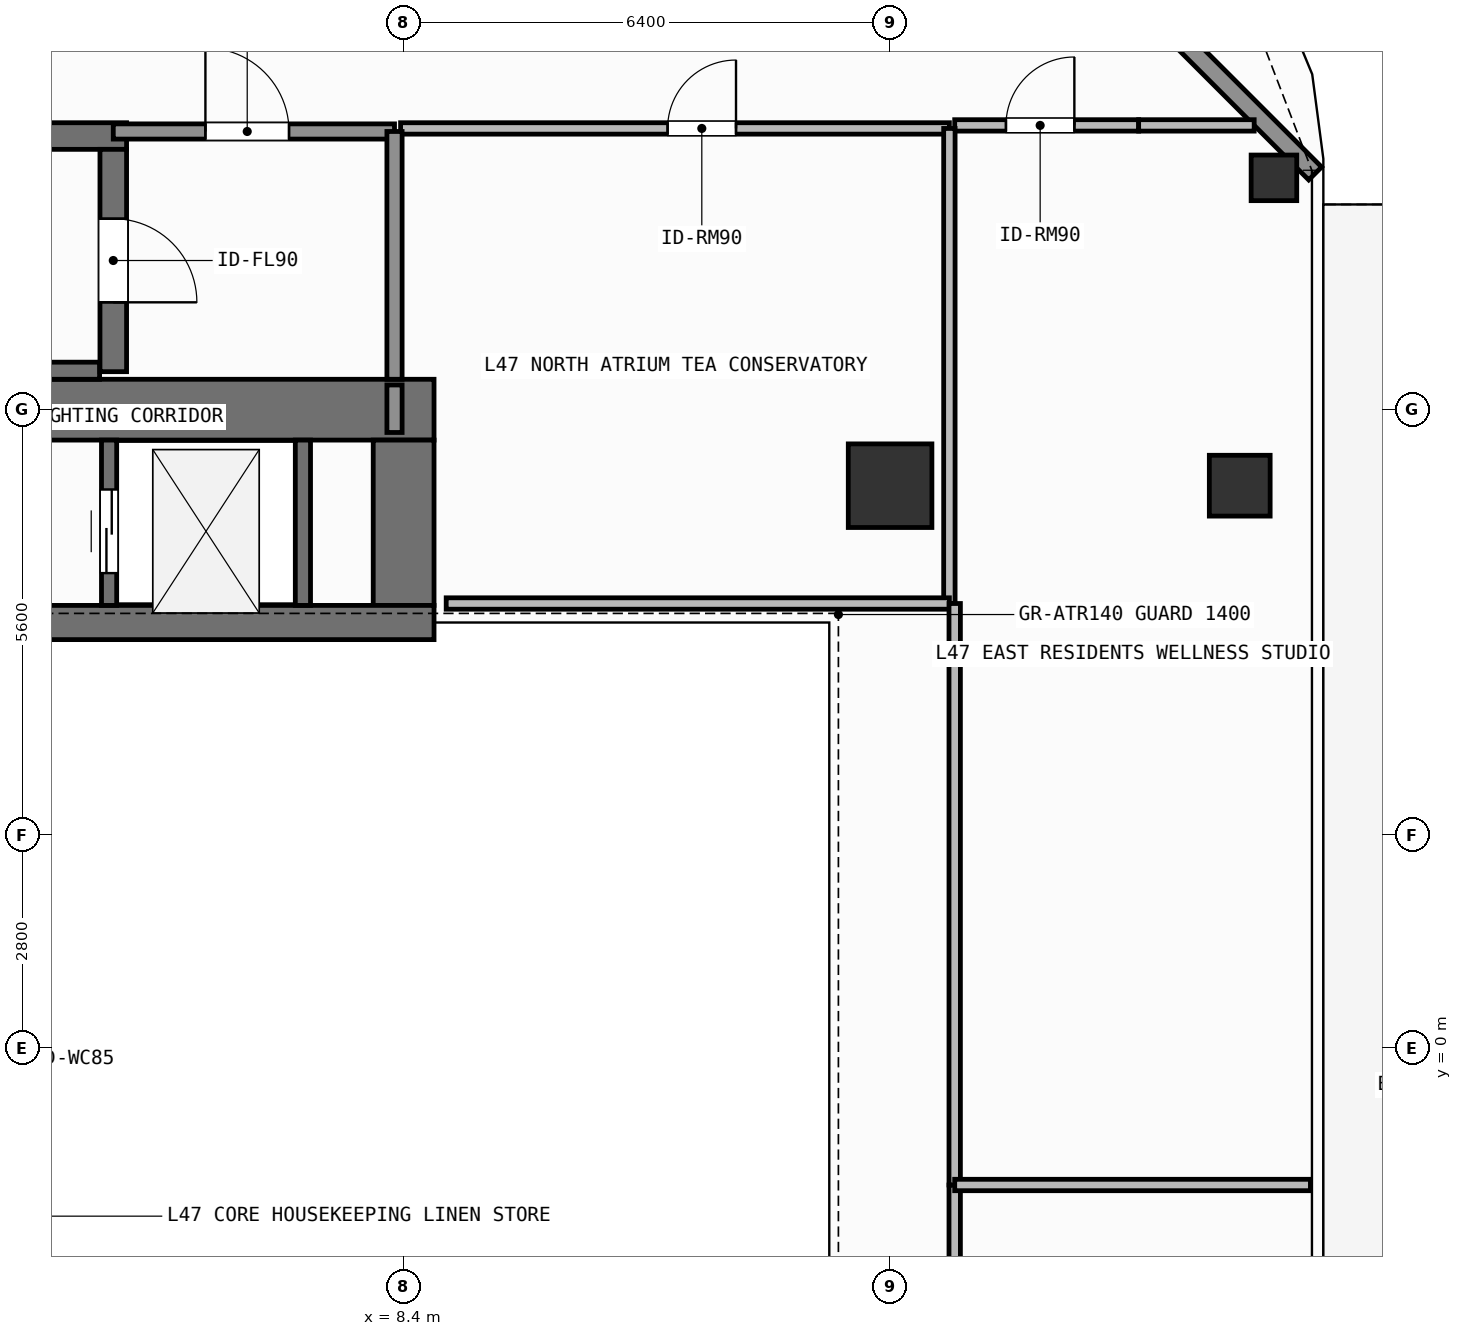
"""IFC4 building model, lengths in metres.
Left out: names, types, materials, properties, quantities, classifications, styles, units other than length and angle.
Written with IfcOpenShell. Run it as: python <this file> out.ifc"""

import sys

from ifc_helpers import new_model, si_unit, direction, frame, frame_2d, origin, origin_2d, place, context, subcontext, project, spatial, rectangle, hollow_rectangle, extrude, element, fill, save


model = new_model("IFC4")
c1 = context("Model", 3, precision=1e-05, world=origin(), true_north=direction((0.0, 1.0)))
c2 = subcontext(c1, "Body", "Model", "MODEL_VIEW")
j1 = project(units=[si_unit("LENGTHUNIT", "METRE"), si_unit("PLANEANGLEUNIT", "RADIAN")], contexts=[c1])
p1 = place(None, origin())
s1 = spatial("IfcSite", under=j1, at=p1, CompositionType="ELEMENT")
p2 = place(p1, origin())
s2 = spatial("IfcBuilding", under=s1, at=p2, CompositionType="ELEMENT")
p3 = place(p2, frame((0.0, 0.0, 191.4)))
s3 = spatial("IfcBuildingStorey", under=s2, at=p3, CompositionType="ELEMENT", Elevation=191.4)
p4 = place(p3, frame((-7.55, 8.4, 0.0), z_axis=(0.0, 0.0, 1.0), x_axis=(1.0, 0.0, 0.0)))
e1 = element("IfcWall", 1, at=p4, inside=s3, PredefinedType="SHEAR", context=c2, shape_type="SweptSolid", body=[
    extrude(rectangle(XDim=16.35, YDim=0.8, at=frame_2d((8.175, 0.0))), origin(), (0.0, 0.0, 1.0), 3.9),
])
p5 = place(p3, frame((8.4, 5.825, 0.0), z_axis=(0.0, 0.0, 1.0), x_axis=(0.0, 1.0, 0.0)))
e2 = element("IfcWall", 2, at=p5, inside=s3, PredefinedType="SHEAR", context=c2, shape_type="SweptSolid", body=[
    extrude(rectangle(XDim=2.175, YDim=0.8, at=frame_2d((1.087, 0.0))), origin(), (0.0, 0.0, 1.0), 3.9),
])
p6 = place(p3, frame((3.045, 5.6, 0.0), z_axis=(0.0, 0.0, 1.0), x_axis=(1.0, 0.0, 0.0)))
e3 = element("IfcWall", 3, at=p6, inside=s3, PredefinedType="SHEAR", context=c2, shape_type="SweptSolid", body=[
    extrude(rectangle(XDim=5.755, YDim=0.45, at=frame_2d((2.877, 0.0))), origin(), (0.0, 0.0, 1.0), 3.9),
])
p7 = place(p3, frame((-2.555, 12.0, 0.0), z_axis=(0.0, 0.0, 1.0), x_axis=(1.0, 0.0, 0.0)))
e4 = element("IfcWall", 4, at=p7, inside=s3, PredefinedType="SHEAR", context=c2, shape_type="SweptSolid", body=[
    extrude(rectangle(XDim=7.31, YDim=0.35, at=frame_2d((3.655, 0.0))), origin(), (0.0, 0.0, 1.0), 3.9),
])
p8 = place(p3, frame((-2.2, 8.913, 0.0), z_axis=(0.0, 0.0, 1.0), x_axis=(1.0, 0.0, 0.0)))
e5 = element("IfcWall", 5, at=p8, inside=s3, PredefinedType="SHEAR", context=c2, shape_type="SweptSolid", body=[
    extrude(rectangle(XDim=6.6, YDim=0.225, at=frame_2d((3.3, 0.0))), origin(), (0.0, 0.0, 1.0), 3.9),
])
p9 = place(p3, frame((4.58, 11.825, 0.0), z_axis=(0.0, 0.0, 1.0), x_axis=(0.0, -1.0, 0.0)))
e6 = element("IfcWall", 6, at=p9, inside=s3, PredefinedType="SHEAR", context=c2, shape_type="SweptSolid", body=[
    extrude(rectangle(XDim=2.925, YDim=0.35, at=frame_2d((1.462, 0.0))), origin(), (0.0, 0.0, 1.0), 3.9),
])
p10 = place(p9, frame((0.913, 0.0, 0.0)))
e7 = element("IfcOpeningElement", 7, at=p10, cuts=e6, PredefinedType="OPENING", context=c2, shape_type="SweptSolid", body=[
    extrude(rectangle(XDim=1.1, YDim=2.15, at=frame_2d((0.55, 1.075))), frame((0.0, 0.185, 0.0), z_axis=(0.0, -1.0, 0.0), x_axis=(1.0, 0.0, 0.0)), (0.0, 0.0, 1.0), 0.37),
])
p11 = place(p3, frame((14.8, 7.4, 0.0), z_axis=(0.0, 0.0, 1.0), x_axis=(1.0, 0.0, 0.0)))
e8 = element("IfcColumn", 8, at=p11, inside=s3, PredefinedType="COLUMN", context=c2, shape_type="SweptSolid", body=[
    extrude(rectangle(XDim=1.1, YDim=1.1, at=origin_2d()), origin(), (0.0, 0.0, 1.0), 3.9),
])
p12 = place(p3, frame((19.4, 7.4, 0.0), z_axis=(0.0, 0.0, 1.0), x_axis=(1.0, 0.0, 0.0)))
e9 = element("IfcColumn", 9, at=p12, inside=s3, PredefinedType="COLUMN", context=c2, shape_type="SweptSolid", body=[
    extrude(hollow_rectangle(XDim=0.8, YDim=0.8, WallThickness=0.036, at=origin_2d()), origin(), (0.0, 0.0, 1.0), 3.9),
])
p13 = place(p3, frame((19.85, 11.45, 0.0), z_axis=(0.0, 0.0, 1.0), x_axis=(1.0, 0.0, 0.0)))
e10 = element("IfcColumn", 10, at=p13, inside=s3, PredefinedType="COLUMN", context=c2, shape_type="SweptSolid", body=[
    extrude(hollow_rectangle(XDim=0.6, YDim=0.6, WallThickness=0.028, at=origin_2d()), origin(), (0.0, 0.0, 1.0), 3.9),
])
p14 = place(p3, frame((16.008, 15.892, 0.0), z_axis=(0.0, 0.0, 1.0), x_axis=(0.707106781187, -0.707106781187, 0.0)))
e11 = element("IfcWall", 11, at=p14, inside=s3, PredefinedType="SOLIDWALL", context=c2, shape_type="SweptSolid", body=[
    extrude(rectangle(XDim=6.201, YDim=0.24, at=frame_2d((3.101, 0.0))), origin(), (0.0, 0.0, 1.0), 3.68),
])
p15 = place(p3, frame((4.525, 5.825, 0.0), z_axis=(0.0, 0.0, 1.0), x_axis=(0.0, 1.0, 0.0)))
e12 = element("IfcWall", 12, at=p15, inside=s3, PredefinedType="SHEAR", context=c2, shape_type="SweptSolid", body=[
    extrude(rectangle(XDim=2.175, YDim=0.2, at=frame_2d((1.087, 0.0))), origin(), (0.0, 0.0, 1.0), 3.68),
])
p16 = place(p15, frame((0.425, 0.0, 0.0)))
e13 = element("IfcOpeningElement", 13, at=p16, cuts=e12, PredefinedType="OPENING", context=c2, shape_type="SweptSolid", body=[
    extrude(rectangle(XDim=1.1, YDim=2.2, at=frame_2d((0.55, 1.1))), frame((0.0, 0.11, 0.0), z_axis=(0.0, -1.0, 0.0), x_axis=(1.0, 0.0, 0.0)), (0.0, 0.0, 1.0), 0.22),
])
p17 = place(p3, frame((7.075, 5.825, 0.0), z_axis=(0.0, 0.0, 1.0), x_axis=(0.0, 1.0, 0.0)))
e14 = element("IfcWall", 14, at=p17, inside=s3, PredefinedType="SHEAR", context=c2, shape_type="SweptSolid", body=[
    extrude(rectangle(XDim=2.175, YDim=0.2, at=frame_2d((1.087, 0.0))), origin(), (0.0, 0.0, 1.0), 3.68),
])
p18 = place(p3, frame((4.58, 12.06, 0.0), z_axis=(0.0, 0.0, 1.0), x_axis=(1.0, 0.0, 0.0)))
e15 = element("IfcWall", 15, at=p18, inside=s3, PredefinedType="SOLIDWALL", context=c2, shape_type="SweptSolid", body=[
    extrude(rectangle(XDim=3.7, YDim=0.2, at=frame_2d((1.85, 0.0))), origin(), (0.0, 0.0, 1.0), 3.68),
])
p19 = place(p18, frame((1.212, 0.0, 0.0)))
e16 = element("IfcOpeningElement", 16, at=p19, cuts=e15, PredefinedType="OPENING", context=c2, shape_type="SweptSolid", body=[
    extrude(rectangle(XDim=1.1, YDim=2.15, at=frame_2d((0.55, 1.075))), frame((0.0, 0.11, 0.0), z_axis=(0.0, -1.0, 0.0), x_axis=(1.0, 0.0, 0.0)), (0.0, 0.0, 1.0), 0.22),
])
p20 = place(p3, frame((8.36, 12.1, 0.0), z_axis=(0.0, 0.0, 1.0), x_axis=(1.0, 0.0, 0.0)))
e17 = element("IfcWall", 17, at=p20, inside=s3, PredefinedType="PARTITIONING", context=c2, shape_type="SweptSolid", body=[
    extrude(rectangle(XDim=7.22, YDim=0.15, at=frame_2d((3.61, 0.0))), origin(), (0.0, 0.0, 1.0), 3.68),
])
p21 = place(p20, frame((3.513, 0.0, 0.0)))
e18 = element("IfcOpeningElement", 18, at=p21, cuts=e17, PredefinedType="OPENING", context=c2, shape_type="SweptSolid", body=[
    extrude(rectangle(XDim=0.9, YDim=2.1, at=frame_2d((0.45, 1.05))), frame((0.0, 0.085, 0.0), z_axis=(0.0, -1.0, 0.0), x_axis=(1.0, 0.0, 0.0)), (0.0, 0.0, 1.0), 0.17),
])
p22 = place(p3, frame((15.65, 12.14, 0.0), z_axis=(0.0, 0.0, 1.0), x_axis=(1.0, 0.0, 0.0)))
e19 = element("IfcWall", 19, at=p22, inside=s3, PredefinedType="PARTITIONING", context=c2, shape_type="SweptSolid", body=[
    extrude(rectangle(XDim=2.42, YDim=0.15, at=frame_2d((1.21, 0.0))), origin(), (0.0, 0.0, 1.0), 3.68),
])
p23 = place(p22, frame((0.674, 0.0, 0.0)))
e20 = element("IfcOpeningElement", 20, at=p23, cuts=e19, PredefinedType="OPENING", context=c2, shape_type="SweptSolid", body=[
    extrude(rectangle(XDim=0.9, YDim=2.1, at=frame_2d((0.45, 1.05))), frame((0.0, 0.085, 0.0), z_axis=(0.0, -1.0, 0.0), x_axis=(1.0, 0.0, 0.0)), (0.0, 0.0, 1.0), 0.17),
])
p24 = place(p3, frame((8.28, 8.8, 0.0), z_axis=(0.0, 0.0, 1.0), x_axis=(0.0, 1.0, 0.0)))
e21 = element("IfcWall", 21, at=p24, inside=s3, PredefinedType="SOLIDWALL", context=c2, shape_type="SweptSolid", body=[
    extrude(rectangle(XDim=3.26, YDim=0.2, at=frame_2d((1.63, 0.0))), origin(), (0.0, 0.0, 1.0), 3.68),
])
p25 = place(p3, frame((8.28, 8.1, 0.0), z_axis=(0.0, 0.0, 1.0), x_axis=(0.0, 1.0, 0.0)))
e22 = element("IfcWall", 22, at=p25, inside=s3, PredefinedType="SOLIDWALL", context=c2, shape_type="SweptSolid", body=[
    extrude(rectangle(XDim=0.625, YDim=0.2, at=frame_2d((0.312, 0.0))), origin(), (0.0, 0.0, 1.0), 3.68),
])
p26 = place(p3, frame((15.58, 5.85, 0.0), z_axis=(0.0, 0.0, 1.0), x_axis=(0.0, 1.0, 0.0)))
e23 = element("IfcWall", 23, at=p26, inside=s3, PredefinedType="PARTITIONING", context=c2, shape_type="SweptSolid", body=[
    extrude(rectangle(XDim=6.25, YDim=0.15, at=frame_2d((3.125, 0.0))), origin(), (0.0, 0.0, 1.0), 3.68),
])
p27 = place(p3, frame((8.96, 5.85, 0.0), z_axis=(0.0, 0.0, 1.0), x_axis=(1.0, 0.0, 0.0)))
e24 = element("IfcWall", 24, at=p27, inside=s3, PredefinedType="PARTITIONING", context=c2, shape_type="SweptSolid", body=[
    extrude(rectangle(XDim=6.62, YDim=0.15, at=frame_2d((3.31, 0.0))), origin(), (0.0, 0.0, 1.0), 3.68),
])
p28 = place(p3, frame((15.65, -5.85, 0.0), z_axis=(0.0, 0.0, 1.0), x_axis=(0.0, 1.0, 0.0)))
e25 = element("IfcWall", 25, at=p28, inside=s3, PredefinedType="PARTITIONING", context=c2, shape_type="SweptSolid", body=[
    extrude(rectangle(XDim=4.05, YDim=0.15, at=frame_2d((2.025, 0.0))), origin(), (0.0, 0.0, 1.0), 3.68),
])
p29 = place(p3, frame((15.65, -1.8, 0.0), z_axis=(0.0, 0.0, 1.0), x_axis=(0.0, 1.0, 0.0)))
e26 = element("IfcWall", 26, at=p29, inside=s3, PredefinedType="PARTITIONING", context=c2, shape_type="SweptSolid", body=[
    extrude(rectangle(XDim=7.65, YDim=0.15, at=frame_2d((3.825, 0.0))), origin(), (0.0, 0.0, 1.0), 3.68),
])
p30 = place(p3, frame((15.65, -1.8, 0.0), z_axis=(0.0, 0.0, 1.0), x_axis=(1.0, 0.0, 0.0)))
e27 = element("IfcWall", 27, at=p30, inside=s3, PredefinedType="PARTITIONING", context=c2, shape_type="SweptSolid", body=[
    extrude(rectangle(XDim=4.68, YDim=0.15, at=frame_2d((2.34, 0.0))), origin(), (0.0, 0.0, 1.0), 3.68),
])
p31 = place(p3, frame((18.07, 12.14, 0.0), z_axis=(0.0, 0.0, 1.0), x_axis=(1.0, 0.0, 0.0)))
e28 = element("IfcWall", 28, at=p31, inside=s3, PredefinedType="PARTITIONING", context=c2, shape_type="SweptSolid", body=[
    extrude(rectangle(XDim=1.52, YDim=0.15, at=frame_2d((0.76, 0.0))), origin(), (0.0, 0.0, 1.0), 3.68),
])
p32 = place(p16, origin())
e29 = element("IfcDoor", 29, at=p32, inside=s3, OperationType="SLIDING_TO_LEFT", PredefinedType="DOOR", context=c2, shape_type="SweptSolid", body=[
    extrude(rectangle(XDim=1.1, YDim=2.2, at=frame_2d((0.55, 1.1))), frame((0.0, 0.025, 0.0), z_axis=(0.0, -1.0, 0.0), x_axis=(1.0, 0.0, 0.0)), (0.0, 0.0, 1.0), 0.05),
])
fill(e13, e29)
p33 = place(p10, origin())
e30 = element("IfcDoor", 30, at=p33, inside=s3, OperationType="SINGLE_SWING_RIGHT", PredefinedType="DOOR", context=c2, shape_type="SweptSolid", body=[
    extrude(rectangle(XDim=1.1, YDim=2.15, at=frame_2d((0.55, 1.075))), frame((0.0, 0.025, 0.0), z_axis=(0.0, -1.0, 0.0), x_axis=(1.0, 0.0, 0.0)), (0.0, 0.0, 1.0), 0.05),
])
fill(e7, e30)
p34 = place(p19, origin())
e31 = element("IfcDoor", 31, at=p34, inside=s3, OperationType="SINGLE_SWING_LEFT", PredefinedType="DOOR", context=c2, shape_type="SweptSolid", body=[
    extrude(rectangle(XDim=1.1, YDim=2.15, at=frame_2d((0.55, 1.075))), frame((0.0, 0.025, 0.0), z_axis=(0.0, -1.0, 0.0), x_axis=(1.0, 0.0, 0.0)), (0.0, 0.0, 1.0), 0.05),
])
fill(e16, e31)
p35 = place(p21, origin())
e32 = element("IfcDoor", 32, at=p35, inside=s3, OperationType="SINGLE_SWING_RIGHT", PredefinedType="DOOR", context=c2, shape_type="SweptSolid", body=[
    extrude(rectangle(XDim=0.9, YDim=2.1, at=frame_2d((0.45, 1.05))), frame((0.0, 0.025, 0.0), z_axis=(0.0, -1.0, 0.0), x_axis=(1.0, 0.0, 0.0)), (0.0, 0.0, 1.0), 0.05),
])
fill(e18, e32)
p36 = place(p23, origin())
e33 = element("IfcDoor", 33, at=p36, inside=s3, OperationType="SINGLE_SWING_RIGHT", PredefinedType="DOOR", context=c2, shape_type="SweptSolid", body=[
    extrude(rectangle(XDim=0.9, YDim=2.1, at=frame_2d((0.45, 1.05))), frame((0.0, 0.025, 0.0), z_axis=(0.0, -1.0, 0.0), x_axis=(1.0, 0.0, 0.0)), (0.0, 0.0, 1.0), 0.05),
])
fill(e20, e33)
save(model, sys.argv[1])
